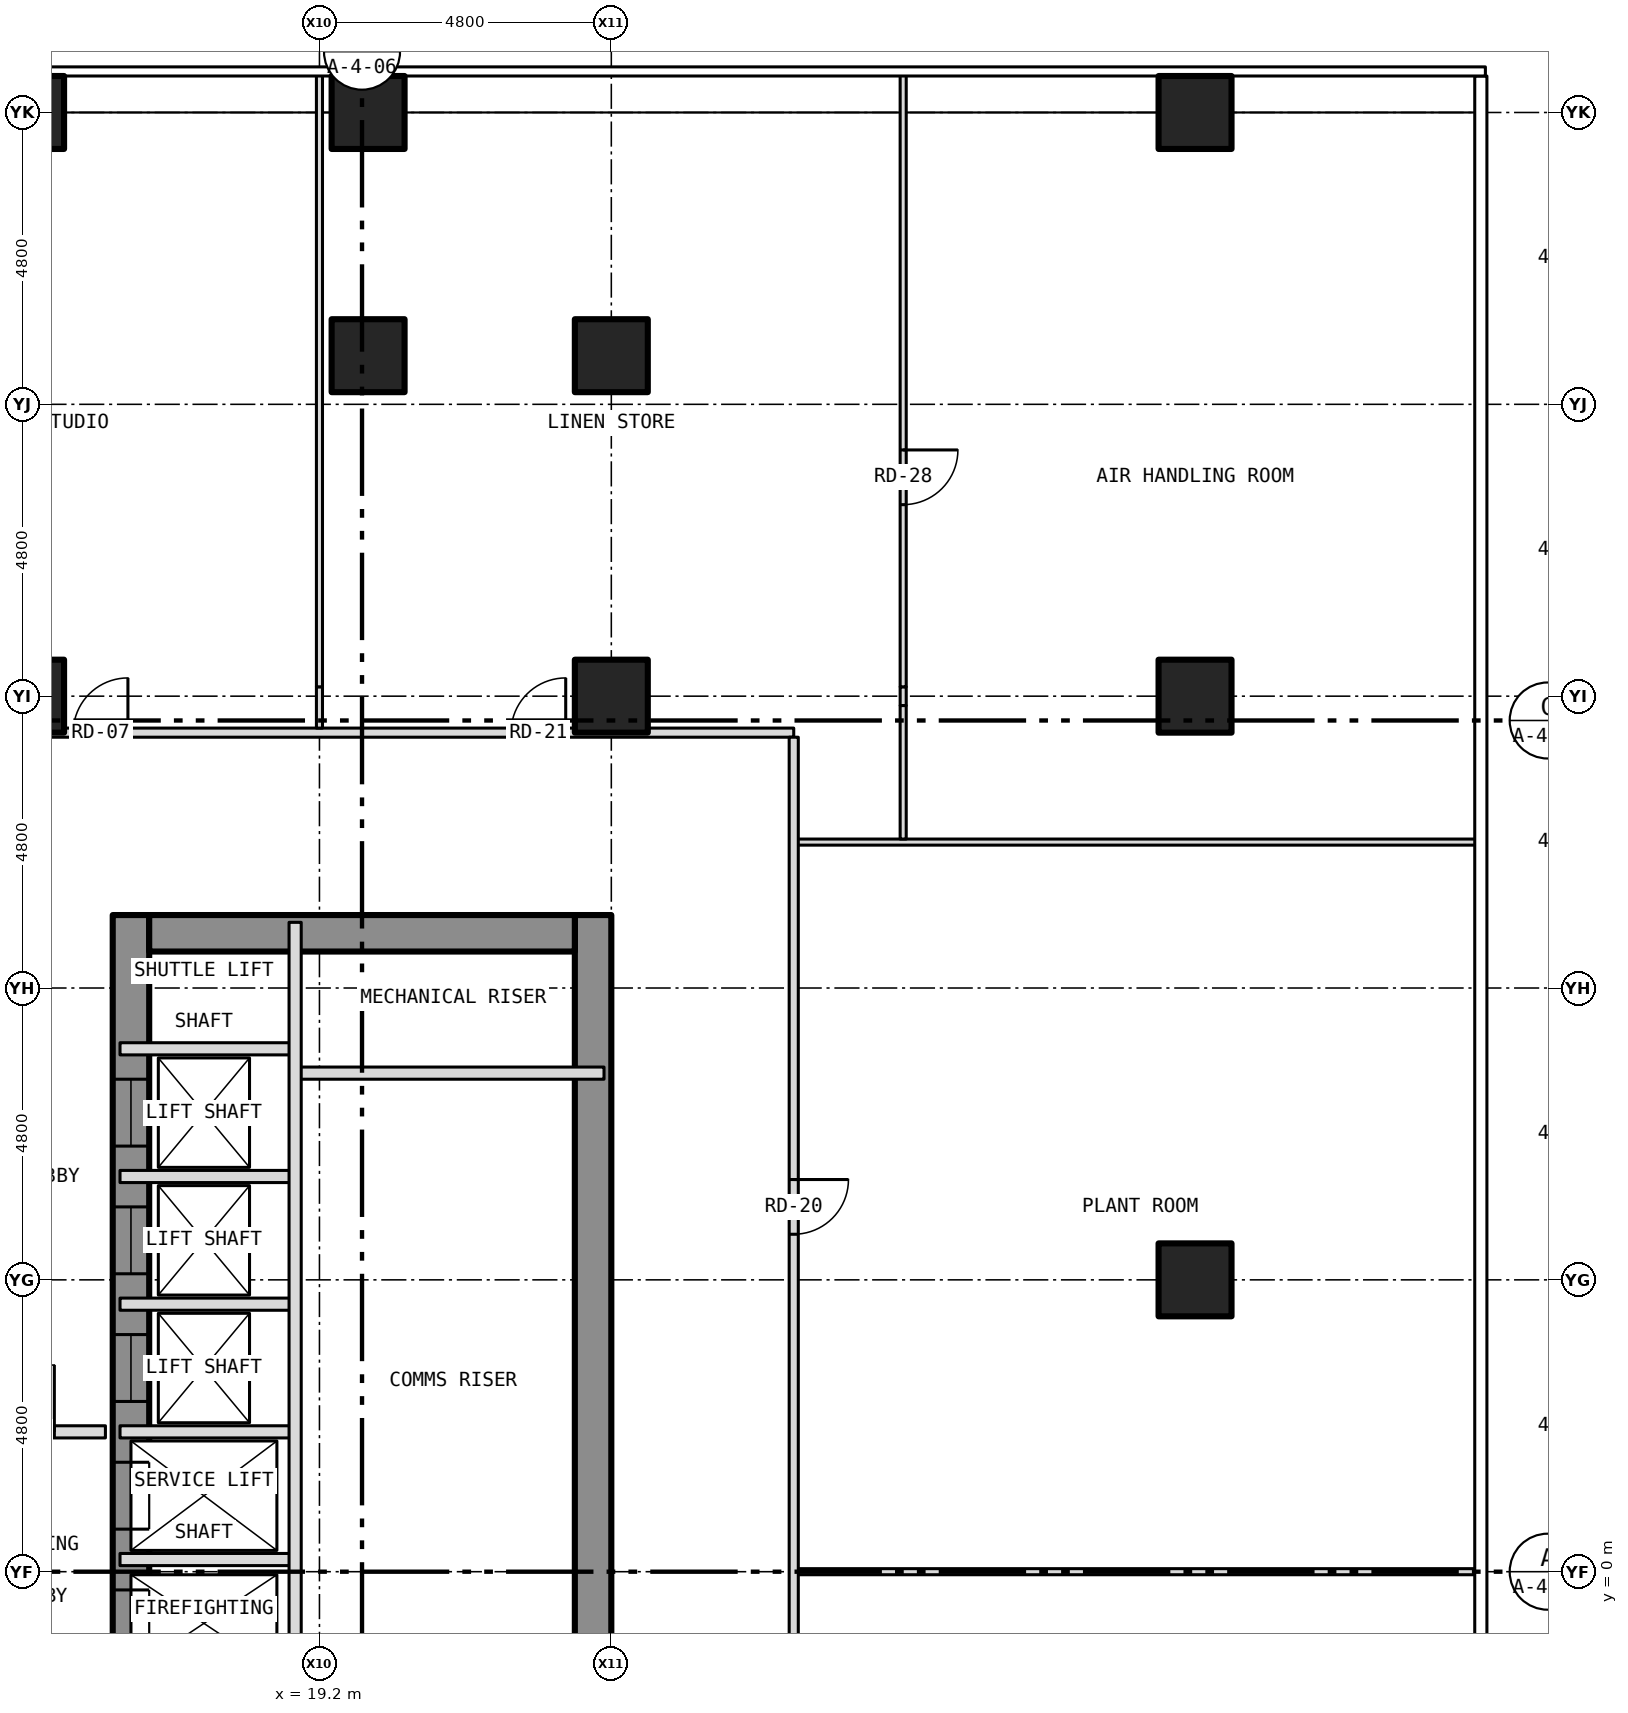
"""IFC4 building model, lengths in metres.
Left out: names, types, materials, properties, quantities, classifications, styles, units other than length and angle.
Written with IfcOpenShell. Run it as: python <this file> out.ifc"""

import sys

from ifc_helpers import new_model, si_unit, direction, frame, frame_2d, origin, origin_2d, place, context, subcontext, project, spatial, rectangle, hollow_rectangle, extrude, element, fill, save


model = new_model("IFC4")
c1 = context("Model", 3, precision=1e-05, world=origin(), true_north=direction((0.0, 1.0)))
c2 = subcontext(c1, "Body", "Model", "MODEL_VIEW")
j1 = project(units=[si_unit("LENGTHUNIT", "METRE"), si_unit("PLANEANGLEUNIT", "RADIAN")], contexts=[c1])
p1 = place(None, origin())
s1 = spatial("IfcSite", under=j1, at=p1, CompositionType="ELEMENT")
p2 = place(p1, origin())
s2 = spatial("IfcBuilding", under=s1, at=p2, CompositionType="ELEMENT")
p3 = place(p2, frame((0.0, 0.0, 24.5)))
s3 = spatial("IfcBuildingStorey", under=s2, at=p3, CompositionType="ELEMENT", Elevation=24.5)
for number, where, z_axis, x_axis in (
    (1, (14.4, 24.0, -0.2), (0.0, 0.0, 1.0), (1.0, 0.0, 0.0)),
    (2, (20.0, 24.0, -0.2), (0.0, 0.0, 1.0), (1.0, 0.0, 0.0)),
    (3, (33.6, 4.8, -0.2), (0.0, 0.0, 1.0), (1.0, 0.0, 0.0)),
    (4, (33.6, 14.4, -0.2), (0.0, 0.0, 1.0), (1.0, 0.0, 0.0)),
    (5, (33.6, 24.0, -0.2), (0.0, 0.0, 1.0), (1.0, 0.0, 0.0)),
    (6, (14.4, 14.4, -0.2), (0.0, 0.0, 1.0), (1.0, 0.0, 0.0)),
    (7, (20.0, 20.0, -0.2), (0.0, 0.0, 1.0), (1.0, 0.0, 0.0)),
    (8, (24.0, 14.4, -0.2), (0.0, 0.0, 1.0), (1.0, 0.0, 0.0)),
    (9, (24.0, 20.0, -0.2), (0.0, 0.0, 1.0), (1.0, 0.0, 0.0)),
):
    element("IfcColumn", number, at=place(p3, frame(where, z_axis=z_axis, x_axis=x_axis)), inside=s3, PredefinedType="COLUMN", context=c2, shape_type="SweptSolid", body=[
        extrude(hollow_rectangle(XDim=1.2, YDim=1.2, WallThickness=0.07, at=origin_2d()), origin(), (0.0, 0.0, 1.0), 4.5),
    ])
p4 = place(p3, frame((16.1, -10.8, 0.0), z_axis=(0.0, 0.0, 1.0), x_axis=(0.0, 1.0, 0.0)))
e10 = element("IfcWall", 10, at=p4, inside=s3, PredefinedType="SHEAR", context=c2, shape_type="SweptSolid", body=[
    extrude(rectangle(XDim=21.6, YDim=0.6, at=frame_2d((10.8, 0.0))), origin(), (0.0, 0.0, 1.0), 4.2),
])
p5 = place(p4, frame((9.4, 0.0, 0.0)))
e11 = element("IfcOpeningElement", 11, at=p5, cuts=e10, PredefinedType="OPENING", context=c2, shape_type="SweptSolid", body=[
    extrude(rectangle(XDim=1.1, YDim=2.1, at=frame_2d((0.55, 1.05))), frame((0.0, 0.312, 0.0), z_axis=(0.0, -1.0, 0.0), x_axis=(1.0, 0.0, 0.0)), (0.0, 0.0, 1.0), 0.624),
])
p6 = place(p4, frame((11.5, 0.0, 0.0)))
e12 = element("IfcOpeningElement", 12, at=p6, cuts=e10, PredefinedType="OPENING", context=c2, shape_type="SweptSolid", body=[
    extrude(rectangle(XDim=1.1, YDim=2.1, at=frame_2d((0.55, 1.05))), frame((0.0, 0.312, 0.0), z_axis=(0.0, -1.0, 0.0), x_axis=(1.0, 0.0, 0.0)), (0.0, 0.0, 1.0), 0.624),
])
p7 = place(p4, frame((13.6, 0.0, 0.0)))
e13 = element("IfcOpeningElement", 13, at=p7, cuts=e10, PredefinedType="OPENING", context=c2, shape_type="SweptSolid", body=[
    extrude(rectangle(XDim=1.1, YDim=2.1, at=frame_2d((0.55, 1.05))), frame((0.0, 0.312, 0.0), z_axis=(0.0, -1.0, 0.0), x_axis=(1.0, 0.0, 0.0)), (0.0, 0.0, 1.0), 0.624),
])
p8 = place(p4, frame((15.7, 0.0, 0.0)))
e14 = element("IfcOpeningElement", 14, at=p8, cuts=e10, PredefinedType="OPENING", context=c2, shape_type="SweptSolid", body=[
    extrude(rectangle(XDim=1.1, YDim=2.1, at=frame_2d((0.55, 1.05))), frame((0.0, 0.312, 0.0), z_axis=(0.0, -1.0, 0.0), x_axis=(1.0, 0.0, 0.0)), (0.0, 0.0, 1.0), 0.624),
])
p9 = place(p4, frame((17.8, 0.0, 0.0)))
e15 = element("IfcOpeningElement", 15, at=p9, cuts=e10, PredefinedType="OPENING", context=c2, shape_type="SweptSolid", body=[
    extrude(rectangle(XDim=1.1, YDim=2.1, at=frame_2d((0.55, 1.05))), frame((0.0, 0.312, 0.0), z_axis=(0.0, -1.0, 0.0), x_axis=(1.0, 0.0, 0.0)), (0.0, 0.0, 1.0), 0.624),
])
p10 = place(p4, frame((5.642, 0.0, 0.0)))
e16 = element("IfcOpeningElement", 16, at=p10, cuts=e10, PredefinedType="OPENING", context=c2, shape_type="SweptSolid", body=[
    extrude(rectangle(XDim=1.1, YDim=2.1, at=frame_2d((0.55, 1.05))), frame((0.0, 0.312, 0.0), z_axis=(0.0, -1.0, 0.0), x_axis=(1.0, 0.0, 0.0)), (0.0, 0.0, 1.0), 0.624),
])
p11 = place(p4, frame((7.5, 0.0, 0.0)))
e17 = element("IfcOpeningElement", 17, at=p11, cuts=e10, PredefinedType="OPENING", context=c2, shape_type="SweptSolid", body=[
    extrude(rectangle(XDim=1.1, YDim=2.1, at=frame_2d((0.55, 1.05))), frame((0.0, 0.312, 0.0), z_axis=(0.0, -1.0, 0.0), x_axis=(1.0, 0.0, 0.0)), (0.0, 0.0, 1.0), 0.624),
])
p12 = place(p3, frame((23.7, -10.8, 0.0), z_axis=(0.0, 0.0, 1.0), x_axis=(0.0, 1.0, 0.0)))
e18 = element("IfcWall", 18, at=p12, inside=s3, PredefinedType="SHEAR", context=c2, shape_type="SweptSolid", body=[
    extrude(rectangle(XDim=21.6, YDim=0.6, at=frame_2d((10.8, 0.0))), origin(), (0.0, 0.0, 1.0), 4.2),
])
p13 = place(p3, frame((16.4, 10.5, 0.0), z_axis=(0.0, 0.0, 1.0), x_axis=(1.0, 0.0, 0.0)))
e19 = element("IfcWall", 19, at=p13, inside=s3, PredefinedType="SHEAR", context=c2, shape_type="SweptSolid", body=[
    extrude(rectangle(XDim=7.0, YDim=0.6, at=frame_2d((3.5, 0.0))), origin(), (0.0, 0.0, 1.0), 4.2),
])
p14 = place(p3, frame((27.0, 0.0, 0.0), z_axis=(0.0, 0.0, 1.0), x_axis=(1.0, 0.0, 0.0)))
e20 = element("IfcWall", 20, at=p14, inside=s3, PredefinedType="PARTITIONING", context=c2, shape_type="SweptSolid", body=[
    extrude(rectangle(XDim=11.28, YDim=0.1, at=frame_2d((5.64, 0.0))), origin(), (0.0, 0.0, 1.0), 4.3),
])
p15 = place(p3, frame((15.92, 0.2, 0.0), z_axis=(0.0, 0.0, 1.0), x_axis=(1.0, 0.0, 0.0)))
e21 = element("IfcWall", 21, at=p15, inside=s3, PredefinedType="PARTITIONING", context=c2, shape_type="SweptSolid", body=[
    extrude(rectangle(XDim=2.88, YDim=0.2, at=frame_2d((1.44, 0.0))), origin(), (0.0, 0.0, 1.0), 4.2),
])
p16 = place(p3, frame((12.4, 2.3, 0.0), z_axis=(0.0, 0.0, 1.0), x_axis=(1.0, 0.0, 0.0)))
e22 = element("IfcWall", 22, at=p16, inside=s3, PredefinedType="PARTITIONING", context=c2, shape_type="SweptSolid", body=[
    extrude(rectangle(XDim=3.28, YDim=0.2, at=frame_2d((1.64, 0.0))), origin(), (0.0, 0.0, 1.0), 4.3),
])
p17 = place(p16, frame((1.34, 0.0, 0.0)))
e23 = element("IfcOpeningElement", 23, at=p17, cuts=e22, PredefinedType="OPENING", context=c2, shape_type="SweptSolid", body=[
    extrude(rectangle(XDim=1.1, YDim=2.1, at=frame_2d((0.55, 1.05))), frame((0.0, 0.112, 0.0), z_axis=(0.0, -1.0, 0.0), x_axis=(1.0, 0.0, 0.0)), (0.0, 0.0, 1.0), 0.224),
])
for number, where, z_axis, x_axis in (
    (24, (15.92, 2.3, 0.0), (0.0, 0.0, 1.0), (1.0, 0.0, 0.0)),
    (25, (15.92, 4.4, 0.0), (0.0, 0.0, 1.0), (1.0, 0.0, 0.0)),
    (26, (15.92, 6.5, 0.0), (0.0, 0.0, 1.0), (1.0, 0.0, 0.0)),
):
    element("IfcWall", number, at=place(p3, frame(where, z_axis=z_axis, x_axis=x_axis)), inside=s3, PredefinedType="PARTITIONING", context=c2, shape_type="SweptSolid", body=[
        extrude(rectangle(XDim=2.88, YDim=0.2, at=frame_2d((1.44, 0.0))), origin(), (0.0, 0.0, 1.0), 4.2),
    ])
p18 = place(p3, frame((18.8, 8.2, 0.0), z_axis=(0.0, 0.0, 1.0), x_axis=(1.0, 0.0, 0.0)))
e27 = element("IfcWall", 27, at=p18, inside=s3, PredefinedType="PARTITIONING", context=c2, shape_type="SweptSolid", body=[
    extrude(rectangle(XDim=5.08, YDim=0.2, at=frame_2d((2.54, 0.0))), origin(), (0.0, 0.0, 1.0), 4.2),
])
p19 = place(p3, frame((15.92, 8.6, 0.0), z_axis=(0.0, 0.0, 1.0), x_axis=(1.0, 0.0, 0.0)))
e28 = element("IfcWall", 28, at=p19, inside=s3, PredefinedType="PARTITIONING", context=c2, shape_type="SweptSolid", body=[
    extrude(rectangle(XDim=2.88, YDim=0.2, at=frame_2d((1.44, 0.0))), origin(), (0.0, 0.0, 1.0), 4.2),
])
p20 = place(p3, frame((27.0, 12.0, 0.0), z_axis=(0.0, 0.0, 1.0), x_axis=(1.0, 0.0, 0.0)))
e29 = element("IfcWall", 29, at=p20, inside=s3, PredefinedType="PARTITIONING", context=c2, shape_type="SweptSolid", body=[
    extrude(rectangle(XDim=11.28, YDim=0.1, at=frame_2d((5.64, 0.0))), origin(), (0.0, 0.0, 1.0), 4.3),
])
p21 = place(p3, frame((-27.0, 13.8, 0.0), z_axis=(0.0, 0.0, 1.0), x_axis=(1.0, 0.0, 0.0)))
e30 = element("IfcWall", 30, at=p21, inside=s3, PredefinedType="PARTITIONING", context=c2, shape_type="SweptSolid", body=[
    extrude(rectangle(XDim=54.0, YDim=0.15, at=frame_2d((27.0, 0.0))), origin(), (0.0, 0.0, 1.0), 4.3),
])
p22 = place(p21, frame((42.15, 0.0, 0.0)))
e31 = element("IfcOpeningElement", 31, at=p22, cuts=e30, PredefinedType="OPENING", context=c2, shape_type="SweptSolid", body=[
    extrude(rectangle(XDim=0.9, YDim=2.1, at=frame_2d((0.45, 1.05))), frame((0.0, 0.087, 0.0), z_axis=(0.0, -1.0, 0.0), x_axis=(1.0, 0.0, 0.0)), (0.0, 0.0, 1.0), 0.174),
])
p23 = place(p21, frame((3.75, 0.0, 0.0)))
e32 = element("IfcOpeningElement", 32, at=p23, cuts=e30, PredefinedType="OPENING", context=c2, shape_type="SweptSolid", body=[
    extrude(rectangle(XDim=0.9, YDim=2.1, at=frame_2d((0.45, 1.05))), frame((0.0, 0.087, 0.0), z_axis=(0.0, -1.0, 0.0), x_axis=(1.0, 0.0, 0.0)), (0.0, 0.0, 1.0), 0.174),
])
p24 = place(p21, frame((49.35, 0.0, 0.0)))
e33 = element("IfcOpeningElement", 33, at=p24, cuts=e30, PredefinedType="OPENING", context=c2, shape_type="SweptSolid", body=[
    extrude(rectangle(XDim=0.9, YDim=2.1, at=frame_2d((0.45, 1.05))), frame((0.0, 0.087, 0.0), z_axis=(0.0, -1.0, 0.0), x_axis=(1.0, 0.0, 0.0)), (0.0, 0.0, 1.0), 0.174),
])
p25 = place(p21, frame((13.35, 0.0, 0.0)))
e34 = element("IfcOpeningElement", 34, at=p25, cuts=e30, PredefinedType="OPENING", context=c2, shape_type="SweptSolid", body=[
    extrude(rectangle(XDim=0.9, YDim=2.1, at=frame_2d((0.45, 1.05))), frame((0.0, 0.087, 0.0), z_axis=(0.0, -1.0, 0.0), x_axis=(1.0, 0.0, 0.0)), (0.0, 0.0, 1.0), 0.174),
])
p26 = place(p21, frame((32.55, 0.0, 0.0)))
e35 = element("IfcOpeningElement", 35, at=p26, cuts=e30, PredefinedType="OPENING", context=c2, shape_type="SweptSolid", body=[
    extrude(rectangle(XDim=0.9, YDim=2.1, at=frame_2d((0.45, 1.05))), frame((0.0, 0.087, 0.0), z_axis=(0.0, -1.0, 0.0), x_axis=(1.0, 0.0, 0.0)), (0.0, 0.0, 1.0), 0.174),
])
p27 = place(p3, frame((18.8, -1.8, 0.0), z_axis=(0.0, 0.0, 1.0), x_axis=(0.0, 1.0, 0.0)))
e36 = element("IfcWall", 36, at=p27, inside=s3, PredefinedType="PARTITIONING", context=c2, shape_type="SweptSolid", body=[
    extrude(rectangle(XDim=12.48, YDim=0.2, at=frame_2d((6.24, 0.0))), origin(), (0.0, 0.0, 1.0), 4.2),
])
p28 = place(p3, frame((19.2, 13.875, 0.0), z_axis=(0.0, 0.0, 1.0), x_axis=(0.0, 1.0, 0.0)))
e37 = element("IfcWall", 37, at=p28, inside=s3, PredefinedType="PARTITIONING", context=c2, shape_type="SweptSolid", body=[
    extrude(rectangle(XDim=0.679, YDim=0.1, at=frame_2d((0.339, 0.0))), origin(), (0.0, 0.0, 1.0), 4.3),
])
p29 = place(p3, frame((19.2, 14.554, 0.0), z_axis=(0.0, 0.0, 1.0), x_axis=(0.0, 1.0, 0.0)))
e38 = element("IfcWall", 38, at=p29, inside=s3, PredefinedType="PARTITIONING", context=c2, shape_type="SweptSolid", body=[
    extrude(rectangle(XDim=10.076, YDim=0.1, at=frame_2d((5.038, 0.0))), origin(), (0.0, 0.0, 1.0), 3.683),
])
p30 = place(p3, frame((27.0, -13.725, 0.0), z_axis=(0.0, 0.0, 1.0), x_axis=(0.0, 1.0, 0.0)))
e39 = element("IfcWall", 39, at=p30, inside=s3, PredefinedType="PARTITIONING", context=c2, shape_type="SweptSolid", body=[
    extrude(rectangle(XDim=27.45, YDim=0.15, at=frame_2d((13.725, 0.0))), origin(), (0.0, 0.0, 1.0), 4.3),
])
p31 = place(p30, frame((7.275, 0.0, 0.0)))
e40 = element("IfcOpeningElement", 40, at=p31, cuts=e39, PredefinedType="OPENING", context=c2, shape_type="SweptSolid", body=[
    extrude(rectangle(XDim=0.9, YDim=2.1, at=frame_2d((0.45, 1.05))), frame((0.0, 0.087, 0.0), z_axis=(0.0, -1.0, 0.0), x_axis=(1.0, 0.0, 0.0)), (0.0, 0.0, 1.0), 0.174),
])
p32 = place(p30, frame((19.275, 0.0, 0.0)))
e41 = element("IfcOpeningElement", 41, at=p32, cuts=e39, PredefinedType="OPENING", context=c2, shape_type="SweptSolid", body=[
    extrude(rectangle(XDim=0.9, YDim=2.1, at=frame_2d((0.45, 1.05))), frame((0.0, 0.087, 0.0), z_axis=(0.0, -1.0, 0.0), x_axis=(1.0, 0.0, 0.0)), (0.0, 0.0, 1.0), 0.174),
])
p33 = place(p3, frame((28.8, 12.05, 0.0), z_axis=(0.0, 0.0, 1.0), x_axis=(0.0, 1.0, 0.0)))
e42 = element("IfcWall", 42, at=p33, inside=s3, PredefinedType="PARTITIONING", context=c2, shape_type="SweptSolid", body=[
    extrude(rectangle(XDim=2.196, YDim=0.1, at=frame_2d((1.098, 0.0))), origin(), (0.0, 0.0, 1.0), 3.683),
])
p34 = place(p3, frame((28.8, 14.246, 0.0), z_axis=(0.0, 0.0, 1.0), x_axis=(0.0, 1.0, 0.0)))
e43 = element("IfcWall", 43, at=p34, inside=s3, PredefinedType="PARTITIONING", context=c2, shape_type="SweptSolid", body=[
    extrude(rectangle(XDim=0.308, YDim=0.1, at=frame_2d((0.154, 0.0))), origin(), (0.0, 0.0, 1.0), 4.3),
])
p35 = place(p3, frame((28.8, 14.554, 0.0), z_axis=(0.0, 0.0, 1.0), x_axis=(0.0, 1.0, 0.0)))
e44 = element("IfcWall", 44, at=p35, inside=s3, PredefinedType="PARTITIONING", context=c2, shape_type="SweptSolid", body=[
    extrude(rectangle(XDim=10.076, YDim=0.1, at=frame_2d((5.038, 0.0))), origin(), (0.0, 0.0, 1.0), 3.683),
])
p36 = place(p35, frame((2.996, 0.0, 0.0)))
e45 = element("IfcOpeningElement", 45, at=p36, cuts=e44, PredefinedType="OPENING", context=c2, shape_type="SweptSolid", body=[
    extrude(rectangle(XDim=0.9, YDim=2.1, at=frame_2d((0.45, 1.05))), frame((0.0, 0.062, 0.0), z_axis=(0.0, -1.0, 0.0), x_axis=(1.0, 0.0, 0.0)), (0.0, 0.0, 1.0), 0.124),
])
p37 = place(p5, origin())
e46 = element("IfcDoor", 46, at=p37, inside=s3, OperationType="SLIDING_TO_LEFT", PredefinedType="DOOR", context=c2, shape_type="SweptSolid", body=[
    extrude(rectangle(XDim=1.1, YDim=2.1, at=frame_2d((0.55, 1.05))), frame((0.0, 0.025, 0.0), z_axis=(0.0, -1.0, 0.0), x_axis=(1.0, 0.0, 0.0)), (0.0, 0.0, 1.0), 0.05),
])
fill(e11, e46)
p38 = place(p6, origin())
e47 = element("IfcDoor", 47, at=p38, inside=s3, OperationType="SLIDING_TO_LEFT", PredefinedType="DOOR", context=c2, shape_type="SweptSolid", body=[
    extrude(rectangle(XDim=1.1, YDim=2.1, at=frame_2d((0.55, 1.05))), frame((0.0, 0.025, 0.0), z_axis=(0.0, -1.0, 0.0), x_axis=(1.0, 0.0, 0.0)), (0.0, 0.0, 1.0), 0.05),
])
fill(e12, e47)
p39 = place(p7, origin())
e48 = element("IfcDoor", 48, at=p39, inside=s3, OperationType="SLIDING_TO_LEFT", PredefinedType="DOOR", context=c2, shape_type="SweptSolid", body=[
    extrude(rectangle(XDim=1.1, YDim=2.1, at=frame_2d((0.55, 1.05))), frame((0.0, 0.025, 0.0), z_axis=(0.0, -1.0, 0.0), x_axis=(1.0, 0.0, 0.0)), (0.0, 0.0, 1.0), 0.05),
])
fill(e13, e48)
p40 = place(p8, origin())
e49 = element("IfcDoor", 49, at=p40, inside=s3, OperationType="SLIDING_TO_LEFT", PredefinedType="DOOR", context=c2, shape_type="SweptSolid", body=[
    extrude(rectangle(XDim=1.1, YDim=2.1, at=frame_2d((0.55, 1.05))), frame((0.0, 0.025, 0.0), z_axis=(0.0, -1.0, 0.0), x_axis=(1.0, 0.0, 0.0)), (0.0, 0.0, 1.0), 0.05),
])
fill(e14, e49)
p41 = place(p9, origin())
e50 = element("IfcDoor", 50, at=p41, inside=s3, OperationType="SLIDING_TO_LEFT", PredefinedType="DOOR", context=c2, shape_type="SweptSolid", body=[
    extrude(rectangle(XDim=1.1, YDim=2.1, at=frame_2d((0.55, 1.05))), frame((0.0, 0.025, 0.0), z_axis=(0.0, -1.0, 0.0), x_axis=(1.0, 0.0, 0.0)), (0.0, 0.0, 1.0), 0.05),
])
fill(e15, e50)
p42 = place(p17, origin())
e51 = element("IfcDoor", 51, at=p42, inside=s3, OperationType="SINGLE_SWING_RIGHT", PredefinedType="DOOR", context=c2, shape_type="SweptSolid", body=[
    extrude(rectangle(XDim=1.1, YDim=2.1, at=frame_2d((0.55, 1.05))), frame((0.0, 0.025, 0.0), z_axis=(0.0, -1.0, 0.0), x_axis=(1.0, 0.0, 0.0)), (0.0, 0.0, 1.0), 0.05),
])
fill(e23, e51)
p43 = place(p22, origin())
e52 = element("IfcDoor", 52, at=p43, inside=s3, OperationType="SINGLE_SWING_RIGHT", PredefinedType="DOOR", context=c2, shape_type="SweptSolid", body=[
    extrude(rectangle(XDim=0.9, YDim=2.1, at=frame_2d((0.45, 1.05))), frame((0.0, 0.025, 0.0), z_axis=(0.0, -1.0, 0.0), x_axis=(1.0, 0.0, 0.0)), (0.0, 0.0, 1.0), 0.05),
])
fill(e31, e52)
p44 = place(p32, origin())
e53 = element("IfcDoor", 53, at=p44, inside=s3, OperationType="SINGLE_SWING_RIGHT", PredefinedType="DOOR", context=c2, shape_type="SweptSolid", body=[
    extrude(rectangle(XDim=0.9, YDim=2.1, at=frame_2d((0.45, 1.05))), frame((0.0, 0.025, 0.0), z_axis=(0.0, -1.0, 0.0), x_axis=(1.0, 0.0, 0.0)), (0.0, 0.0, 1.0), 0.05),
])
fill(e41, e53)
p45 = place(p24, origin())
e54 = element("IfcDoor", 54, at=p45, inside=s3, OperationType="SINGLE_SWING_RIGHT", PredefinedType="DOOR", context=c2, shape_type="SweptSolid", body=[
    extrude(rectangle(XDim=0.9, YDim=2.1, at=frame_2d((0.45, 1.05))), frame((0.0, 0.025, 0.0), z_axis=(0.0, -1.0, 0.0), x_axis=(1.0, 0.0, 0.0)), (0.0, 0.0, 1.0), 0.05),
])
fill(e33, e54)
p46 = place(p36, origin())
e55 = element("IfcDoor", 55, at=p46, inside=s3, OperationType="SINGLE_SWING_RIGHT", PredefinedType="DOOR", context=c2, shape_type="SweptSolid", body=[
    extrude(rectangle(XDim=0.9, YDim=2.1, at=frame_2d((0.45, 1.05))), frame((0.0, 0.025, 0.0), z_axis=(0.0, -1.0, 0.0), x_axis=(1.0, 0.0, 0.0)), (0.0, 0.0, 1.0), 0.05),
])
fill(e45, e55)
save(model, sys.argv[1])
